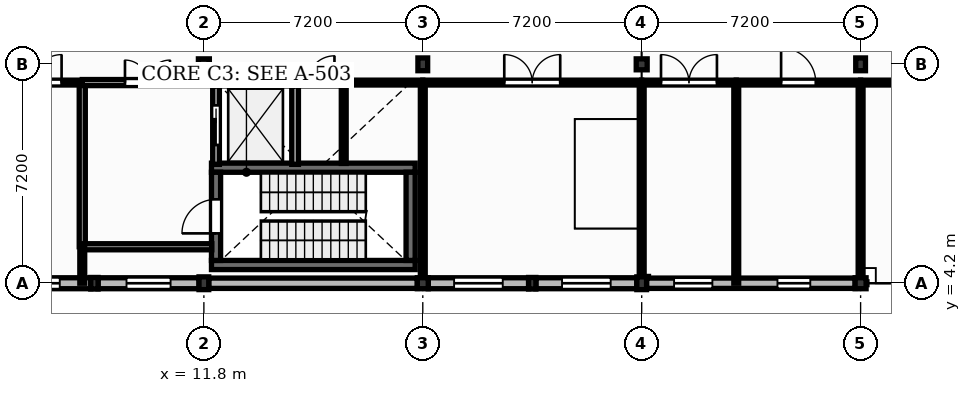
"""IFC4 building model, lengths in metres.
Left out: names, types, materials, properties, quantities, classifications, styles, units other than length and angle.
Written with IfcOpenShell. Run it as: python <this file> out.ifc"""

import sys

from ifc_helpers import new_model, si_unit, direction, frame, frame_2d, origin, origin_2d, place, context, subcontext, project, spatial, rectangle, extrude, element, fill, save


model = new_model("IFC4")
c1 = context("Model", 3, precision=1e-05, world=origin(), true_north=direction((0.0, 1.0)))
c2 = subcontext(c1, "Body", "Model", "MODEL_VIEW")
j1 = project(units=[si_unit("LENGTHUNIT", "METRE"), si_unit("PLANEANGLEUNIT", "RADIAN")], contexts=[c1])
p1 = place(None, origin())
s1 = spatial("IfcSite", under=j1, at=p1, CompositionType="ELEMENT")
p2 = place(p1, origin())
s2 = spatial("IfcBuilding", under=s1, at=p2, CompositionType="ELEMENT")
p3 = place(p2, frame((0.0, 0.0, 4.5)))
s3 = spatial("IfcBuildingStorey", under=s2, at=p3, CompositionType="ELEMENT", Elevation=4.5)
p4 = place(p3, frame((11.8, 4.2, 0.0), z_axis=(0.0, 0.0, 1.0), x_axis=(1.0, 0.0, 0.0)))
e1 = element("IfcColumn", 1, at=p4, inside=s3, PredefinedType="COLUMN", context=c2, shape_type="SweptSolid", body=[
    extrude(rectangle(XDim=0.32, YDim=0.42, at=origin_2d()), origin(), (0.0, 0.0, 1.0), 4.26),
])
for number, where, z_axis, x_axis in (
    (2, (11.8, 11.4, 0.0), (0.0, 0.0, 1.0), (1.0, 0.0, 0.0)),
    (3, (19.0, 4.2, 0.0), (0.0, 0.0, 1.0), (1.0, 0.0, 0.0)),
):
    element("IfcColumn", number, at=place(p3, frame(where, z_axis=z_axis, x_axis=x_axis)), inside=s3, PredefinedType="COLUMN", context=c2, shape_type="SweptSolid", body=[
        extrude(rectangle(XDim=0.36, YDim=0.36, at=origin_2d()), origin(), (0.0, 0.0, 1.0), 4.26),
    ])
for number, where, z_axis, x_axis in (
    (4, (19.0, 11.4, 0.0), (0.0, 0.0, 1.0), (1.0, 0.0, 0.0)),
    (5, (26.2, 4.2, 0.0), (0.0, 0.0, 1.0), (1.0, 0.0, 0.0)),
):
    element("IfcColumn", number, at=place(p3, frame(where, z_axis=z_axis, x_axis=x_axis)), inside=s3, PredefinedType="COLUMN", context=c2, shape_type="SweptSolid", body=[
        extrude(rectangle(XDim=0.32, YDim=0.42, at=origin_2d()), origin(), (0.0, 0.0, 1.0), 4.26),
    ])
for number, where, z_axis, x_axis in (
    (6, (26.2, 11.4, 0.0), (0.0, 0.0, 1.0), (1.0, 0.0, 0.0)),
    (7, (33.4, 4.2, 0.0), (0.0, 0.0, 1.0), (1.0, 0.0, 0.0)),
):
    element("IfcColumn", number, at=place(p3, frame(where, z_axis=z_axis, x_axis=x_axis)), inside=s3, PredefinedType="COLUMN", context=c2, shape_type="SweptSolid", body=[
        extrude(rectangle(XDim=0.36, YDim=0.36, at=origin_2d()), origin(), (0.0, 0.0, 1.0), 4.26),
    ])
p5 = place(p3, frame((33.4, 11.4, 0.0), z_axis=(0.0, 0.0, 1.0), x_axis=(1.0, 0.0, 0.0)))
e8 = element("IfcColumn", 8, at=p5, inside=s3, PredefinedType="COLUMN", context=c2, shape_type="SweptSolid", body=[
    extrude(rectangle(XDim=0.32, YDim=0.42, at=origin_2d()), origin(), (0.0, 0.0, 1.0), 4.26),
])
for number, where, z_axis, x_axis in (
    (9, (8.2, 4.2, 0.0), (0.0, 0.0, 1.0), (1.0, 0.0, 0.0)),
    (10, (22.6, 4.2, 0.0), (0.0, 0.0, 1.0), (1.0, 0.0, 0.0)),
):
    element("IfcColumn", number, at=place(p3, frame(where, z_axis=z_axis, x_axis=x_axis)), inside=s3, PredefinedType="PILASTER", context=c2, shape_type="SweptSolid", body=[
        extrude(rectangle(XDim=0.24, YDim=0.38, at=origin_2d()), origin(), (0.0, 0.0, 1.0), 4.26),
    ])
p6 = place(p3, frame((4.78, 4.2, 0.0), z_axis=(0.0, 0.0, 1.0), x_axis=(1.0, 0.0, 0.0)))
e11 = element("IfcWall", 11, at=p6, inside=s3, PredefinedType="SOLIDWALL", context=c2, shape_type="SweptSolid", body=[
    extrude(rectangle(XDim=3.3, YDim=0.36, at=frame_2d((1.65, 0.0))), origin(), (0.0, 0.0, 1.0), 3.8),
])
p7 = place(p6, frame((0.86, 0.0, 0.9)))
e12 = element("IfcOpeningElement", 12, at=p7, cuts=e11, PredefinedType="OPENING", context=c2, shape_type="SweptSolid", body=[
    extrude(rectangle(XDim=1.42, YDim=2.4, at=frame_2d((0.71, 1.2))), frame((0.0, 0.19, 0.0), z_axis=(0.0, -1.0, 0.0), x_axis=(1.0, 0.0, 0.0)), (0.0, 0.0, 1.0), 0.38),
])
p8 = place(p3, frame((8.32, 4.2, 0.0), z_axis=(0.0, 0.0, 1.0), x_axis=(1.0, 0.0, 0.0)))
e13 = element("IfcWall", 13, at=p8, inside=s3, PredefinedType="SOLIDWALL", context=c2, shape_type="SweptSolid", body=[
    extrude(rectangle(XDim=3.32, YDim=0.36, at=frame_2d((1.66, 0.0))), origin(), (0.0, 0.0, 1.0), 3.8),
])
p9 = place(p8, frame((0.935, 0.0, 1.35)))
e14 = element("IfcOpeningElement", 14, at=p9, cuts=e13, PredefinedType="OPENING", context=c2, shape_type="SweptSolid", body=[
    extrude(rectangle(XDim=1.45, YDim=1.4, at=frame_2d((0.725, 0.7))), frame((0.0, 0.19, 0.0), z_axis=(0.0, -1.0, 0.0), x_axis=(1.0, 0.0, 0.0)), (0.0, 0.0, 1.0), 0.38),
])
p10 = place(p3, frame((11.96, 4.2, 0.0), z_axis=(0.0, 0.0, 1.0), x_axis=(1.0, 0.0, 0.0)))
e15 = element("IfcWall", 15, at=p10, inside=s3, PredefinedType="SOLIDWALL", context=c2, shape_type="SweptSolid", body=[
    extrude(rectangle(XDim=6.86, YDim=0.34, at=frame_2d((3.43, 0.0))), origin(), (0.0, 0.0, 1.0), 3.8),
])
p11 = place(p3, frame((19.18, 4.2, 0.0), z_axis=(0.0, 0.0, 1.0), x_axis=(1.0, 0.0, 0.0)))
e16 = element("IfcWall", 16, at=p11, inside=s3, PredefinedType="SOLIDWALL", context=c2, shape_type="SweptSolid", body=[
    extrude(rectangle(XDim=3.3, YDim=0.36, at=frame_2d((1.65, 0.0))), origin(), (0.0, 0.0, 1.0), 3.8),
])
p12 = place(p11, frame((0.85, 0.0, 1.0)))
e17 = element("IfcOpeningElement", 17, at=p12, cuts=e16, PredefinedType="OPENING", context=c2, shape_type="SweptSolid", body=[
    extrude(rectangle(XDim=1.6, YDim=2.2, at=frame_2d((0.8, 1.1))), frame((0.0, 0.19, 0.0), z_axis=(0.0, -1.0, 0.0), x_axis=(1.0, 0.0, 0.0)), (0.0, 0.0, 1.0), 0.38),
])
p13 = place(p3, frame((22.72, 4.2, 0.0), z_axis=(0.0, 0.0, 1.0), x_axis=(1.0, 0.0, 0.0)))
e18 = element("IfcWall", 18, at=p13, inside=s3, PredefinedType="SOLIDWALL", context=c2, shape_type="SweptSolid", body=[
    extrude(rectangle(XDim=3.32, YDim=0.36, at=frame_2d((1.66, 0.0))), origin(), (0.0, 0.0, 1.0), 3.8),
])
p14 = place(p13, frame((0.86, 0.0, 1.0)))
e19 = element("IfcOpeningElement", 19, at=p14, cuts=e18, PredefinedType="OPENING", context=c2, shape_type="SweptSolid", body=[
    extrude(rectangle(XDim=1.6, YDim=2.2, at=frame_2d((0.8, 1.1))), frame((0.0, 0.19, 0.0), z_axis=(0.0, -1.0, 0.0), x_axis=(1.0, 0.0, 0.0)), (0.0, 0.0, 1.0), 0.38),
])
p15 = place(p3, frame((26.36, 4.2, 0.0), z_axis=(0.0, 0.0, 1.0), x_axis=(1.0, 0.0, 0.0)))
e20 = element("IfcWall", 20, at=p15, inside=s3, PredefinedType="SOLIDWALL", context=c2, shape_type="SweptSolid", body=[
    extrude(rectangle(XDim=6.86, YDim=0.34, at=frame_2d((3.43, 0.0))), origin(), (0.0, 0.0, 1.0), 3.8),
])
p16 = place(p15, frame((0.905, 0.0, 1.05)))
e21 = element("IfcOpeningElement", 21, at=p16, cuts=e20, PredefinedType="OPENING", context=c2, shape_type="SweptSolid", body=[
    extrude(rectangle(XDim=1.26, YDim=1.65, at=frame_2d((0.63, 0.825))), frame((0.0, 0.18, 0.0), z_axis=(0.0, -1.0, 0.0), x_axis=(1.0, 0.0, 0.0)), (0.0, 0.0, 1.0), 0.36),
])
p17 = place(p15, frame((4.305, 0.0, 1.0)))
e22 = element("IfcOpeningElement", 22, at=p17, cuts=e20, PredefinedType="OPENING", context=c2, shape_type="SweptSolid", body=[
    extrude(rectangle(XDim=1.08, YDim=1.95, at=frame_2d((0.54, 0.975))), frame((0.0, 0.18, 0.0), z_axis=(0.0, -1.0, 0.0), x_axis=(1.0, 0.0, 0.0)), (0.0, 0.0, 1.0), 0.36),
])
for number, where, z_axis, x_axis in (
    (23, (12.05, 4.8, 0.0), (0.0, 0.0, 1.0), (1.0, 0.0, 0.0)),
    (24, (12.05, 8.0, 0.0), (0.0, 0.0, 1.0), (1.0, 0.0, 0.0)),
):
    element("IfcWall", number, at=place(p3, frame(where, z_axis=z_axis, x_axis=x_axis)), inside=s3, PredefinedType="SHEAR", context=c2, shape_type="SweptSolid", body=[
        extrude(rectangle(XDim=6.7, YDim=0.3, at=frame_2d((3.35, 0.0))), origin(), (0.0, 0.0, 1.0), 4.25),
    ])
p18 = place(p3, frame((12.2, 4.95, 0.0), z_axis=(0.0, 0.0, 1.0), x_axis=(0.0, 1.0, 0.0)))
e25 = element("IfcWall", 25, at=p18, inside=s3, PredefinedType="SHEAR", context=c2, shape_type="SweptSolid", body=[
    extrude(rectangle(XDim=2.9, YDim=0.3, at=frame_2d((1.45, 0.0))), origin(), (0.0, 0.0, 1.0), 4.25),
])
p19 = place(p18, frame((0.89, 0.0, 0.0)))
e26 = element("IfcOpeningElement", 26, at=p19, cuts=e25, PredefinedType="OPENING", context=c2, shape_type="SweptSolid", body=[
    extrude(rectangle(XDim=1.12, YDim=2.1, at=frame_2d((0.56, 1.05))), frame((0.0, 0.16, 0.0), z_axis=(0.0, -1.0, 0.0), x_axis=(1.0, 0.0, 0.0)), (0.0, 0.0, 1.0), 0.32),
])
p20 = place(p3, frame((18.6, 4.95, 0.0), z_axis=(0.0, 0.0, 1.0), x_axis=(0.0, 1.0, 0.0)))
e27 = element("IfcWall", 27, at=p20, inside=s3, PredefinedType="SHEAR", context=c2, shape_type="SweptSolid", body=[
    extrude(rectangle(XDim=2.9, YDim=0.3, at=frame_2d((1.45, 0.0))), origin(), (0.0, 0.0, 1.0), 4.25),
])
p21 = place(p3, frame((12.2, 10.8, 0.0), z_axis=(0.0, 0.0, 1.0), x_axis=(1.0, 0.0, 0.0)))
e28 = element("IfcWall", 28, at=p21, inside=s3, PredefinedType="SOLIDWALL", context=c2, shape_type="SweptSolid", body=[
    extrude(rectangle(XDim=2.6, YDim=0.22, at=frame_2d((1.3, 0.0))), origin(), (0.0, 0.0, 1.0), 4.25),
])
p22 = place(p3, frame((12.2, 8.11, 0.0), z_axis=(0.0, 0.0, 1.0), x_axis=(0.0, 1.0, 0.0)))
e29 = element("IfcWall", 29, at=p22, inside=s3, PredefinedType="SOLIDWALL", context=c2, shape_type="SweptSolid", body=[
    extrude(rectangle(XDim=2.58, YDim=0.22, at=frame_2d((1.29, 0.0))), origin(), (0.0, 0.0, 1.0), 4.25),
])
p23 = place(p22, frame((0.64, 0.0, 0.0)))
e30 = element("IfcOpeningElement", 30, at=p23, cuts=e29, PredefinedType="OPENING", context=c2, shape_type="SweptSolid", body=[
    extrude(rectangle(XDim=1.3, YDim=2.2, at=frame_2d((0.65, 1.1))), frame((0.0, 0.12, 0.0), z_axis=(0.0, -1.0, 0.0), x_axis=(1.0, 0.0, 0.0)), (0.0, 0.0, 1.0), 0.24),
])
p24 = place(p3, frame((14.8, 8.11, 0.0), z_axis=(0.0, 0.0, 1.0), x_axis=(0.0, 1.0, 0.0)))
e31 = element("IfcWall", 31, at=p24, inside=s3, PredefinedType="SOLIDWALL", context=c2, shape_type="SweptSolid", body=[
    extrude(rectangle(XDim=2.58, YDim=0.22, at=frame_2d((1.29, 0.0))), origin(), (0.0, 0.0, 1.0), 4.25),
])
p25 = place(p3, frame((4.6, 10.8, 0.0), z_axis=(0.0, 0.0, 1.0), x_axis=(1.0, 0.0, 0.0)))
e32 = element("IfcWall", 32, at=p25, inside=s3, PredefinedType="PARTITIONING", context=c2, shape_type="SweptSolid", body=[
    extrude(rectangle(XDim=3.2, YDim=0.16, at=frame_2d((1.6, 0.0))), origin(), (0.0, 0.0, 1.0), 4.18),
])
p26 = place(p25, frame((0.68, 0.0, 0.0)))
e33 = element("IfcOpeningElement", 33, at=p26, cuts=e32, PredefinedType="OPENING", context=c2, shape_type="SweptSolid", body=[
    extrude(rectangle(XDim=1.84, YDim=2.35, at=frame_2d((0.92, 1.175))), frame((0.0, 0.09, 0.0), z_axis=(0.0, -1.0, 0.0), x_axis=(1.0, 0.0, 0.0)), (0.0, 0.0, 1.0), 0.18),
])
p27 = place(p3, frame((7.8, 5.4, 0.0), z_axis=(0.0, 0.0, 1.0), x_axis=(0.0, 1.0, 0.0)))
e34 = element("IfcWall", 34, at=p27, inside=s3, PredefinedType="PARTITIONING", context=c2, shape_type="SweptSolid", body=[
    extrude(rectangle(XDim=5.33, YDim=0.2, at=frame_2d((2.665, 0.0))), origin(), (0.0, 0.0, 1.0), 4.18),
])
p28 = place(p3, frame((7.8, 10.8, 0.0), z_axis=(0.0, 0.0, 1.0), x_axis=(1.0, 0.0, 0.0)))
e35 = element("IfcWall", 35, at=p28, inside=s3, PredefinedType="PARTITIONING", context=c2, shape_type="SweptSolid", body=[
    extrude(rectangle(XDim=4.29, YDim=0.2, at=frame_2d((2.145, 0.0))), origin(), (0.0, 0.0, 1.0), 4.18),
])
p29 = place(p28, frame((1.405, 0.0, 0.0)))
e36 = element("IfcOpeningElement", 36, at=p29, cuts=e35, PredefinedType="OPENING", context=c2, shape_type="SweptSolid", body=[
    extrude(rectangle(XDim=1.48, YDim=2.25, at=frame_2d((0.74, 1.125))), frame((0.0, 0.11, 0.0), z_axis=(0.0, -1.0, 0.0), x_axis=(1.0, 0.0, 0.0)), (0.0, 0.0, 1.0), 0.22),
])
p30 = place(p3, frame((14.91, 10.8, 0.0), z_axis=(0.0, 0.0, 1.0), x_axis=(1.0, 0.0, 0.0)))
e37 = element("IfcWall", 37, at=p30, inside=s3, PredefinedType="SOLIDWALL", context=c2, shape_type="SweptSolid", body=[
    extrude(rectangle(XDim=1.49, YDim=0.22, at=frame_2d((0.745, 0.0))), origin(), (0.0, 0.0, 1.0), 4.18),
])
p31 = place(p30, frame((0.305, 0.0, 0.0)))
e38 = element("IfcOpeningElement", 38, at=p31, cuts=e37, PredefinedType="OPENING", context=c2, shape_type="SweptSolid", body=[
    extrude(rectangle(XDim=0.88, YDim=2.05, at=frame_2d((0.44, 1.025))), frame((0.0, 0.12, 0.0), z_axis=(0.0, -1.0, 0.0), x_axis=(1.0, 0.0, 0.0)), (0.0, 0.0, 1.0), 0.24),
])
p32 = place(p3, frame((19.0, 10.8, 0.0), z_axis=(0.0, 0.0, 1.0), x_axis=(1.0, 0.0, 0.0)))
e39 = element("IfcWall", 39, at=p32, inside=s3, PredefinedType="PARTITIONING", context=c2, shape_type="SweptSolid", body=[
    extrude(rectangle(XDim=7.2, YDim=0.16, at=frame_2d((3.6, 0.0))), origin(), (0.0, 0.0, 1.0), 4.18),
])
p33 = place(p32, frame((2.68, 0.0, 0.0)))
e40 = element("IfcOpeningElement", 40, at=p33, cuts=e39, PredefinedType="OPENING", context=c2, shape_type="SweptSolid", body=[
    extrude(rectangle(XDim=1.84, YDim=2.35, at=frame_2d((0.92, 1.175))), frame((0.0, 0.09, 0.0), z_axis=(0.0, -1.0, 0.0), x_axis=(1.0, 0.0, 0.0)), (0.0, 0.0, 1.0), 0.18),
])
p34 = place(p3, frame((26.2, 4.41, 0.0), z_axis=(0.0, 0.0, 1.0), x_axis=(0.0, 1.0, 0.0)))
e41 = element("IfcWall", 41, at=p34, inside=s3, PredefinedType="PARTITIONING", context=c2, shape_type="SweptSolid", body=[
    extrude(rectangle(XDim=6.32, YDim=0.16, at=frame_2d((3.16, 0.0))), origin(), (0.0, 0.0, 1.0), 3.74),
])
p35 = place(p3, frame((26.2, 10.8, 0.0), z_axis=(0.0, 0.0, 1.0), x_axis=(1.0, 0.0, 0.0)))
e42 = element("IfcWall", 42, at=p35, inside=s3, PredefinedType="PARTITIONING", context=c2, shape_type="SweptSolid", body=[
    extrude(rectangle(XDim=3.11, YDim=0.16, at=frame_2d((1.555, 0.0))), origin(), (0.0, 0.0, 1.0), 4.18),
])
p36 = place(p35, frame((0.635, 0.0, 0.0)))
e43 = element("IfcOpeningElement", 43, at=p36, cuts=e42, PredefinedType="OPENING", context=c2, shape_type="SweptSolid", body=[
    extrude(rectangle(XDim=1.84, YDim=2.35, at=frame_2d((0.92, 1.175))), frame((0.0, 0.09, 0.0), z_axis=(0.0, -1.0, 0.0), x_axis=(1.0, 0.0, 0.0)), (0.0, 0.0, 1.0), 0.18),
])
p37 = place(p3, frame((29.31, 4.2, 0.0), z_axis=(0.0, 0.0, 1.0), x_axis=(0.0, 1.0, 0.0)))
e44 = element("IfcWall", 44, at=p37, inside=s3, PredefinedType="PARTITIONING", context=c2, shape_type="SweptSolid", body=[
    extrude(rectangle(XDim=6.53, YDim=0.16, at=frame_2d((3.265, 0.0))), origin(), (0.0, 0.0, 1.0), 4.18),
])
p38 = place(p3, frame((29.31, 10.8, 0.0), z_axis=(0.0, 0.0, 1.0), x_axis=(1.0, 0.0, 0.0)))
e45 = element("IfcWall", 45, at=p38, inside=s3, PredefinedType="PARTITIONING", context=c2, shape_type="SweptSolid", body=[
    extrude(rectangle(XDim=4.09, YDim=0.16, at=frame_2d((2.045, 0.0))), origin(), (0.0, 0.0, 1.0), 4.18),
])
p39 = place(p38, frame((1.475, 0.0, 0.0)))
e46 = element("IfcOpeningElement", 46, at=p39, cuts=e45, PredefinedType="OPENING", context=c2, shape_type="SweptSolid", body=[
    extrude(rectangle(XDim=1.14, YDim=2.15, at=frame_2d((0.57, 1.075))), frame((0.0, 0.09, 0.0), z_axis=(0.0, -1.0, 0.0), x_axis=(1.0, 0.0, 0.0)), (0.0, 0.0, 1.0), 0.18),
])
p40 = place(p3, frame((33.4, 4.38, 0.0), z_axis=(0.0, 0.0, 1.0), x_axis=(0.0, 1.0, 0.0)))
e47 = element("IfcWall", 47, at=p40, inside=s3, PredefinedType="PARTITIONING", context=c2, shape_type="SweptSolid", body=[
    extrude(rectangle(XDim=6.35, YDim=0.16, at=frame_2d((3.175, 0.0))), origin(), (0.0, 0.0, 1.0), 3.74),
])
p41 = place(p3, frame((33.4, 10.8, 0.0), z_axis=(0.0, 0.0, 1.0), x_axis=(1.0, 0.0, 0.0)))
e48 = element("IfcWall", 48, at=p41, inside=s3, PredefinedType="PARTITIONING", context=c2, shape_type="SweptSolid", body=[
    extrude(rectangle(XDim=7.2, YDim=0.16, at=frame_2d((3.6, 0.0))), origin(), (0.0, 0.0, 1.0), 4.18),
])
p42 = place(p41, frame((3.03, 0.0, 0.0)))
e49 = element("IfcOpeningElement", 49, at=p42, cuts=e48, PredefinedType="OPENING", context=c2, shape_type="SweptSolid", body=[
    extrude(rectangle(XDim=1.14, YDim=2.15, at=frame_2d((0.57, 1.075))), frame((0.0, 0.09, 0.0), z_axis=(0.0, -1.0, 0.0), x_axis=(1.0, 0.0, 0.0)), (0.0, 0.0, 1.0), 0.18),
])
p43 = place(p3, frame((16.4, 8.14, 0.0), z_axis=(0.0, 0.0, 1.0), x_axis=(0.0, 1.0, 0.0)))
e50 = element("IfcWall", 50, at=p43, inside=s3, PredefinedType="PARTITIONING", context=c2, shape_type="SweptSolid", body=[
    extrude(rectangle(XDim=2.59, YDim=0.16, at=frame_2d((1.295, 0.0))), origin(), (0.0, 0.0, 1.0), 4.18),
])
p44 = place(p3, frame((7.8, 5.4, 0.0), z_axis=(0.0, 0.0, 1.0), x_axis=(1.0, 0.0, 0.0)))
e51 = element("IfcWall", 51, at=p44, inside=s3, PredefinedType="PARTITIONING", context=c2, shape_type="SweptSolid", body=[
    extrude(rectangle(XDim=4.26, YDim=0.2, at=frame_2d((2.13, 0.0))), origin(), (0.0, 0.0, 1.0), 4.18),
])
p45 = place(p3, frame((16.4, 10.8, 0.0), z_axis=(0.0, 0.0, 1.0), x_axis=(1.0, 0.0, 0.0)))
e52 = element("IfcWall", 52, at=p45, inside=s3, PredefinedType="PARTITIONING", context=c2, shape_type="SweptSolid", body=[
    extrude(rectangle(XDim=2.6, YDim=0.16, at=frame_2d((1.3, 0.0))), origin(), (0.0, 0.0, 1.0), 4.18),
])
p46 = place(p3, frame((7.8, 4.2, 0.0), z_axis=(0.0, 0.0, 1.0), x_axis=(0.0, 1.0, 0.0)))
e53 = element("IfcWall", 53, at=p46, inside=s3, PredefinedType="PARTITIONING", context=c2, shape_type="SweptSolid", body=[
    extrude(rectangle(XDim=1.2, YDim=0.16, at=frame_2d((0.6, 0.0))), origin(), (0.0, 0.0, 1.0), 4.18),
])
p47 = place(p3, frame((19.0, 4.38, 0.0), z_axis=(0.0, 0.0, 1.0), x_axis=(0.0, 1.0, 0.0)))
e54 = element("IfcWall", 54, at=p47, inside=s3, PredefinedType="PARTITIONING", context=c2, shape_type="SweptSolid", body=[
    extrude(rectangle(XDim=6.35, YDim=0.16, at=frame_2d((3.175, 0.0))), origin(), (0.0, 0.0, 1.0), 3.74),
])
p48 = place(p7, origin())
e55 = element("IfcWindow", 55, at=p48, inside=s3, PartitioningType="SINGLE_PANEL", PredefinedType="WINDOW", context=c2, shape_type="SweptSolid", body=[
    extrude(rectangle(XDim=1.42, YDim=2.4, at=frame_2d((0.71, 1.2))), frame((0.0, 0.03, 0.0), z_axis=(0.0, -1.0, 0.0), x_axis=(1.0, 0.0, 0.0)), (0.0, 0.0, 1.0), 0.06),
])
fill(e12, e55)
p49 = place(p9, origin())
e56 = element("IfcWindow", 56, at=p49, inside=s3, PartitioningType="SINGLE_PANEL", PredefinedType="WINDOW", context=c2, shape_type="SweptSolid", body=[
    extrude(rectangle(XDim=1.45, YDim=1.4, at=frame_2d((0.725, 0.7))), frame((0.0, 0.03, 0.0), z_axis=(0.0, -1.0, 0.0), x_axis=(1.0, 0.0, 0.0)), (0.0, 0.0, 1.0), 0.06),
])
fill(e14, e56)
p50 = place(p12, origin())
e57 = element("IfcWindow", 57, at=p50, inside=s3, PartitioningType="DOUBLE_PANEL_VERTICAL", PredefinedType="WINDOW", context=c2, shape_type="SweptSolid", body=[
    extrude(rectangle(XDim=1.6, YDim=2.2, at=frame_2d((0.8, 1.1))), frame((0.0, 0.03, 0.0), z_axis=(0.0, -1.0, 0.0), x_axis=(1.0, 0.0, 0.0)), (0.0, 0.0, 1.0), 0.06),
])
fill(e17, e57)
p51 = place(p14, origin())
e58 = element("IfcWindow", 58, at=p51, inside=s3, PartitioningType="DOUBLE_PANEL_VERTICAL", PredefinedType="WINDOW", context=c2, shape_type="SweptSolid", body=[
    extrude(rectangle(XDim=1.6, YDim=2.2, at=frame_2d((0.8, 1.1))), frame((0.0, 0.03, 0.0), z_axis=(0.0, -1.0, 0.0), x_axis=(1.0, 0.0, 0.0)), (0.0, 0.0, 1.0), 0.06),
])
fill(e19, e58)
p52 = place(p16, origin())
e59 = element("IfcWindow", 59, at=p52, inside=s3, PartitioningType="SINGLE_PANEL", PredefinedType="WINDOW", context=c2, shape_type="SweptSolid", body=[
    extrude(rectangle(XDim=1.26, YDim=1.65, at=frame_2d((0.63, 0.825))), frame((0.0, 0.03, 0.0), z_axis=(0.0, -1.0, 0.0), x_axis=(1.0, 0.0, 0.0)), (0.0, 0.0, 1.0), 0.06),
])
fill(e21, e59)
p53 = place(p17, origin())
e60 = element("IfcWindow", 60, at=p53, inside=s3, PartitioningType="SINGLE_PANEL", PredefinedType="WINDOW", context=c2, shape_type="SweptSolid", body=[
    extrude(rectangle(XDim=1.08, YDim=1.95, at=frame_2d((0.54, 0.975))), frame((0.0, 0.03, 0.0), z_axis=(0.0, -1.0, 0.0), x_axis=(1.0, 0.0, 0.0)), (0.0, 0.0, 1.0), 0.06),
])
fill(e22, e60)
p54 = place(p23, origin())
e61 = element("IfcDoor", 61, at=p54, inside=s3, OperationType="SLIDING_TO_LEFT", PredefinedType="DOOR", context=c2, shape_type="SweptSolid", body=[
    extrude(rectangle(XDim=1.3, YDim=2.2, at=frame_2d((0.65, 1.1))), frame((0.0, 0.025, 0.0), z_axis=(0.0, -1.0, 0.0), x_axis=(1.0, 0.0, 0.0)), (0.0, 0.0, 1.0), 0.05),
])
fill(e30, e61)
p55 = place(p19, origin())
e62 = element("IfcDoor", 62, at=p55, inside=s3, OperationType="SINGLE_SWING_LEFT", PredefinedType="DOOR", context=c2, shape_type="SweptSolid", body=[
    extrude(rectangle(XDim=1.12, YDim=2.1, at=frame_2d((0.56, 1.05))), frame((0.0, 0.025, 0.0), z_axis=(0.0, -1.0, 0.0), x_axis=(1.0, 0.0, 0.0)), (0.0, 0.0, 1.0), 0.05),
])
fill(e26, e62)
p56 = place(p29, origin())
e63 = element("IfcDoor", 63, at=p56, inside=s3, OperationType="DOUBLE_DOOR_SINGLE_SWING", PredefinedType="DOOR", context=c2, shape_type="SweptSolid", body=[
    extrude(rectangle(XDim=1.48, YDim=2.25, at=frame_2d((0.74, 1.125))), frame((0.0, 0.025, 0.0), z_axis=(0.0, -1.0, 0.0), x_axis=(1.0, 0.0, 0.0)), (0.0, 0.0, 1.0), 0.05),
])
fill(e36, e63)
p57 = place(p31, origin())
e64 = element("IfcDoor", 64, at=p57, inside=s3, OperationType="SINGLE_SWING_RIGHT", PredefinedType="DOOR", context=c2, shape_type="SweptSolid", body=[
    extrude(rectangle(XDim=0.88, YDim=2.05, at=frame_2d((0.44, 1.025))), frame((0.0, 0.025, 0.0), z_axis=(0.0, -1.0, 0.0), x_axis=(1.0, 0.0, 0.0)), (0.0, 0.0, 1.0), 0.05),
])
fill(e38, e64)
p58 = place(p26, origin())
e65 = element("IfcDoor", 65, at=p58, inside=s3, OperationType="DOUBLE_DOOR_SINGLE_SWING", PredefinedType="DOOR", context=c2, shape_type="SweptSolid", body=[
    extrude(rectangle(XDim=1.84, YDim=2.35, at=frame_2d((0.92, 1.175))), frame((0.0, 0.025, 0.0), z_axis=(0.0, -1.0, 0.0), x_axis=(1.0, 0.0, 0.0)), (0.0, 0.0, 1.0), 0.05),
])
fill(e33, e65)
p59 = place(p33, origin())
e66 = element("IfcDoor", 66, at=p59, inside=s3, OperationType="DOUBLE_DOOR_SINGLE_SWING", PredefinedType="DOOR", context=c2, shape_type="SweptSolid", body=[
    extrude(rectangle(XDim=1.84, YDim=2.35, at=frame_2d((0.92, 1.175))), frame((0.0, 0.025, 0.0), z_axis=(0.0, -1.0, 0.0), x_axis=(1.0, 0.0, 0.0)), (0.0, 0.0, 1.0), 0.05),
])
fill(e40, e66)
p60 = place(p36, origin())
e67 = element("IfcDoor", 67, at=p60, inside=s3, OperationType="DOUBLE_DOOR_SINGLE_SWING", PredefinedType="DOOR", context=c2, shape_type="SweptSolid", body=[
    extrude(rectangle(XDim=1.84, YDim=2.35, at=frame_2d((0.92, 1.175))), frame((0.0, 0.025, 0.0), z_axis=(0.0, -1.0, 0.0), x_axis=(1.0, 0.0, 0.0)), (0.0, 0.0, 1.0), 0.05),
])
fill(e43, e67)
p61 = place(p39, origin())
e68 = element("IfcDoor", 68, at=p61, inside=s3, OperationType="SINGLE_SWING_LEFT", PredefinedType="DOOR", context=c2, shape_type="SweptSolid", body=[
    extrude(rectangle(XDim=1.14, YDim=2.15, at=frame_2d((0.57, 1.075))), frame((0.0, 0.025, 0.0), z_axis=(0.0, -1.0, 0.0), x_axis=(1.0, 0.0, 0.0)), (0.0, 0.0, 1.0), 0.05),
])
fill(e46, e68)
save(model, sys.argv[1])
